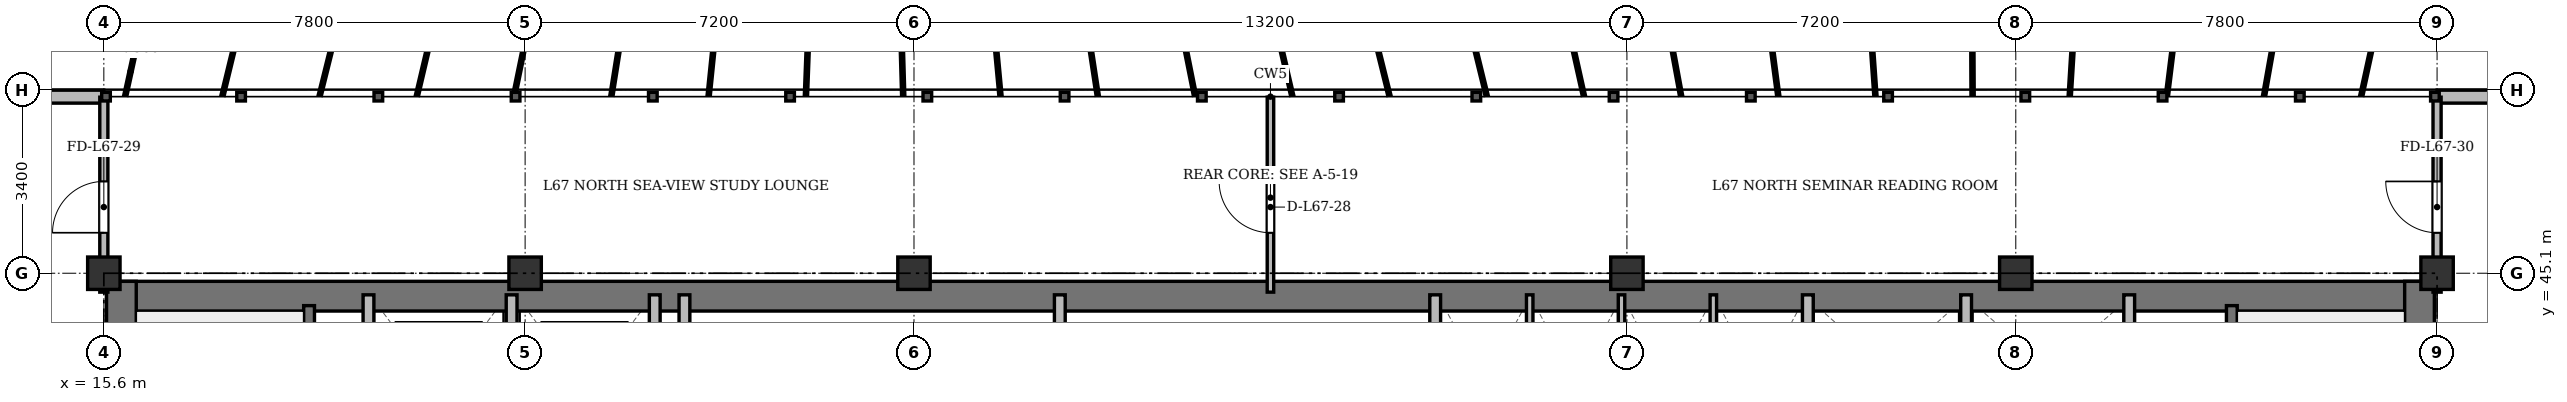
"""IFC4 building model, lengths in metres.
Left out: names, types, materials, properties, quantities, classifications, styles, units other than length and angle.
Written with IfcOpenShell. Run it as: python <this file> out.ifc"""

import sys

from ifc_helpers import new_model, si_unit, direction, frame, frame_2d, origin, origin_2d, place, context, subcontext, project, spatial, rectangle, extrude, source, transform, mapped, element, fill, save


model = new_model("IFC4")
c1 = context("Model", 3, precision=1e-05, world=origin(), true_north=direction((0.0, 1.0)))
c2 = subcontext(c1, "Body", "Model", "MODEL_VIEW")
j1 = project(units=[si_unit("LENGTHUNIT", "METRE"), si_unit("PLANEANGLEUNIT", "RADIAN")], contexts=[c1])
p1 = place(None, origin())
s1 = spatial("IfcSite", under=j1, at=p1, CompositionType="ELEMENT")
p2 = place(p1, origin())
s2 = spatial("IfcBuilding", under=s1, at=p2, CompositionType="ELEMENT")
p3 = place(p2, frame((0.0, 0.0, 259.5)))
s3 = spatial("IfcBuildingStorey", under=s2, at=p3, CompositionType="ELEMENT", Elevation=259.5)
m1 = source(origin(), c2, "Body", "SweptSolid", [
    extrude(rectangle(XDim=0.6, YDim=0.6, at=origin_2d()), origin(), (0.0, 0.0, 1.0), 3.6),
])
for number, where, z_axis, x_axis in (
    (1, (15.6, 45.1, 0.0), (0.0, 0.0, 1.0), (1.0, 0.0, 0.0)),
    (2, (23.4, 45.1, 0.0), (0.0, 0.0, 1.0), (1.0, 0.0, 0.0)),
    (3, (30.6, 45.1, 0.0), (0.0, 0.0, 1.0), (1.0, 0.0, 0.0)),
    (4, (43.8, 45.1, 0.0), (0.0, 0.0, 1.0), (1.0, 0.0, 0.0)),
    (5, (51.0, 45.1, 0.0), (0.0, 0.0, 1.0), (1.0, 0.0, 0.0)),
    (6, (58.8, 45.1, 0.0), (0.0, 0.0, 1.0), (1.0, 0.0, 0.0)),
):
    element("IfcColumn", number, at=place(p3, frame(where, z_axis=z_axis, x_axis=x_axis)), inside=s3, PredefinedType="COLUMN", context=c2, shape_type="MappedRepresentation", body=[
        mapped(m1, transform((0.0, 0.0, 0.0), x_axis=(1.0, 0.0, 0.0), y_axis=(0.0, 1.0, 0.0), z_axis=(0.0, 0.0, 1.0), scale=1.0)),
    ])
p4 = place(p3, frame((11.3, 48.37, 0.0), z_axis=(0.0, 0.0, 1.0), x_axis=(1.0, 0.0, 0.0)))
e7 = element("IfcWall", 7, at=p4, inside=s3, PredefinedType="SOLIDWALL", context=c2, shape_type="SweptSolid", body=[
    extrude(rectangle(XDim=4.3, YDim=0.24, at=frame_2d((2.15, 0.0))), origin(), (0.0, 0.0, 1.0), 3.37),
])
p5 = place(p4, frame((1.848, 0.0, 0.9)))
e8 = element("IfcOpeningElement", 8, at=p5, cuts=e7, PredefinedType="OPENING", context=c2, shape_type="SweptSolid", body=[
    extrude(rectangle(XDim=1.35, YDim=1.5, at=frame_2d((0.675, 0.75))), frame((0.0, 0.13, 0.0), z_axis=(0.0, -1.0, 0.0), x_axis=(1.0, 0.0, 0.0)), (0.0, 0.0, 1.0), 0.26),
])
p6 = place(p3, frame((58.8, 48.37, 0.0), z_axis=(0.0, 0.0, 1.0), x_axis=(1.0, 0.0, 0.0)))
e9 = element("IfcWall", 9, at=p6, inside=s3, PredefinedType="SOLIDWALL", context=c2, shape_type="SweptSolid", body=[
    extrude(rectangle(XDim=4.3, YDim=0.24, at=frame_2d((2.15, 0.0))), origin(), (0.0, 0.0, 1.0), 3.37),
])
p7 = place(p6, frame((1.475, 0.0, 0.9)))
e10 = element("IfcOpeningElement", 10, at=p7, cuts=e9, PredefinedType="OPENING", context=c2, shape_type="SweptSolid", body=[
    extrude(rectangle(XDim=1.35, YDim=1.5, at=frame_2d((0.675, 0.75))), frame((0.0, 0.13, 0.0), z_axis=(0.0, -1.0, 0.0), x_axis=(1.0, 0.0, 0.0)), (0.0, 0.0, 1.0), 0.26),
])
p8 = place(p3, frame((15.65, 44.675, 0.0), z_axis=(0.0, 0.0, 1.0), x_axis=(1.0, 0.0, 0.0)))
e11 = element("IfcWall", 11, at=p8, inside=s3, PredefinedType="SHEAR", context=c2, shape_type="SweptSolid", body=[
    extrude(rectangle(XDim=43.1, YDim=0.55, at=frame_2d((21.55, 0.0))), origin(), (0.0, 0.0, 1.0), 3.37),
])
for number, where, z_axis, x_axis in (
    (12, (15.925, 33.4, 0.0), (0.0, 0.0, 1.0), (0.0, 1.0, 0.0)),
    (13, (58.475, 33.4, 0.0), (0.0, 0.0, 1.0), (0.0, 1.0, 0.0)),
):
    element("IfcWall", number, at=place(p3, frame(where, z_axis=z_axis, x_axis=x_axis)), inside=s3, PredefinedType="SHEAR", context=c2, shape_type="SweptSolid", body=[
        extrude(rectangle(XDim=11.55, YDim=0.55, at=frame_2d((5.775, 0.0))), origin(), (0.0, 0.0, 1.0), 3.37),
    ])
p9 = place(p3, frame((19.4, 33.4, 0.0), z_axis=(0.0, 0.0, 1.0), x_axis=(0.0, 1.0, 0.0)))
e14 = element("IfcWall", 14, at=p9, inside=s3, PredefinedType="SHEAR", context=c2, shape_type="SweptSolid", body=[
    extrude(rectangle(XDim=11.1, YDim=0.2, at=frame_2d((5.55, 0.0))), origin(), (0.0, 0.0, 1.0), 3.37),
])
p10 = place(p9, frame((0.85, 0.0, 0.0)))
e15 = element("IfcOpeningElement", 15, at=p10, cuts=e14, PredefinedType="OPENING", context=c2, shape_type="SweptSolid", body=[
    extrude(rectangle(XDim=1.1, YDim=2.15, at=frame_2d((0.55, 1.075))), frame((0.0, 0.11, 0.0), z_axis=(0.0, -1.0, 0.0), x_axis=(1.0, 0.0, 0.0)), (0.0, 0.0, 1.0), 0.22),
])
p11 = place(p3, frame((55.0, 33.4, 0.0), z_axis=(0.0, 0.0, 1.0), x_axis=(0.0, 1.0, 0.0)))
e16 = element("IfcWall", 16, at=p11, inside=s3, PredefinedType="SHEAR", context=c2, shape_type="SweptSolid", body=[
    extrude(rectangle(XDim=11.1, YDim=0.2, at=frame_2d((5.55, 0.0))), origin(), (0.0, 0.0, 1.0), 3.37),
])
p12 = place(p11, frame((0.85, 0.0, 0.0)))
e17 = element("IfcOpeningElement", 17, at=p12, cuts=e16, PredefinedType="OPENING", context=c2, shape_type="SweptSolid", body=[
    extrude(rectangle(XDim=1.1, YDim=2.15, at=frame_2d((0.55, 1.075))), frame((0.0, 0.11, 0.0), z_axis=(0.0, -1.0, 0.0), x_axis=(1.0, 0.0, 0.0)), (0.0, 0.0, 1.0), 0.22),
])
for number, where, z_axis, x_axis in (
    (18, (20.5, 41.3, 0.0), (0.0, 0.0, 1.0), (0.0, 1.0, 0.0)),
    (19, (23.15, 41.3, 0.0), (0.0, 0.0, 1.0), (0.0, 1.0, 0.0)),
    (20, (25.8, 41.3, 0.0), (0.0, 0.0, 1.0), (0.0, 1.0, 0.0)),
):
    element("IfcWall", number, at=place(p3, frame(where, z_axis=z_axis, x_axis=x_axis)), inside=s3, PredefinedType="SOLIDWALL", context=c2, shape_type="SweptSolid", body=[
        extrude(rectangle(XDim=3.4, YDim=0.2, at=frame_2d((1.7, 0.0))), origin(), (0.0, 0.0, 1.0), 3.37),
    ])
for number, where, z_axis, x_axis in (
    (21, (26.35, 33.4, 0.0), (0.0, 0.0, 1.0), (0.0, 1.0, 0.0)),
    (22, (33.3, 33.4, 0.0), (0.0, 0.0, 1.0), (0.0, 1.0, 0.0)),
):
    element("IfcWall", number, at=place(p3, frame(where, z_axis=z_axis, x_axis=x_axis)), inside=s3, PredefinedType="SOLIDWALL", context=c2, shape_type="SweptSolid", body=[
        extrude(rectangle(XDim=11.3, YDim=0.2, at=frame_2d((5.65, 0.0))), origin(), (0.0, 0.0, 1.0), 2.92),
    ])
p13 = place(p3, frame((40.25, 41.5, 0.0), z_axis=(0.0, 0.0, 1.0), x_axis=(0.0, 1.0, 0.0)))
e23 = element("IfcWall", 23, at=p13, inside=s3, PredefinedType="SOLIDWALL", context=c2, shape_type="SweptSolid", body=[
    extrude(rectangle(XDim=3.2, YDim=0.2, at=frame_2d((1.6, 0.0))), origin(), (0.0, 0.0, 1.0), 3.37),
])
for number, where, z_axis, x_axis in (
    (24, (42.0, 41.5, 0.0), (0.0, 0.0, 1.0), (0.0, 1.0, 0.0)),
    (25, (43.7, 41.5, 0.0), (0.0, 0.0, 1.0), (0.0, 1.0, 0.0)),
    (26, (45.4, 41.5, 0.0), (0.0, 0.0, 1.0), (0.0, 1.0, 0.0)),
):
    element("IfcWall", number, at=place(p3, frame(where, z_axis=z_axis, x_axis=x_axis)), inside=s3, PredefinedType="PARTITIONING", context=c2, shape_type="SweptSolid", body=[
        extrude(rectangle(XDim=3.2, YDim=0.12, at=frame_2d((1.6, 0.0))), origin(), (0.0, 0.0, 1.0), 3.37),
    ])
p14 = place(p3, frame((47.15, 33.4, 0.0), z_axis=(0.0, 0.0, 1.0), x_axis=(0.0, 1.0, 0.0)))
e27 = element("IfcWall", 27, at=p14, inside=s3, PredefinedType="SOLIDWALL", context=c2, shape_type="SweptSolid", body=[
    extrude(rectangle(XDim=11.3, YDim=0.2, at=frame_2d((5.65, 0.0))), origin(), (0.0, 0.0, 1.0), 2.92),
])
for number, where, z_axis, x_axis in (
    (28, (50.08, 42.05, 0.0), (0.0, 0.0, 1.0), (0.0, 1.0, 0.0)),
    (29, (53.1, 42.05, 0.0), (0.0, 0.0, 1.0), (0.0, 1.0, 0.0)),
):
    element("IfcWall", number, at=place(p3, frame(where, z_axis=z_axis, x_axis=x_axis)), inside=s3, PredefinedType="SOLIDWALL", context=c2, shape_type="SweptSolid", body=[
        extrude(rectangle(XDim=2.65, YDim=0.2, at=frame_2d((1.325, 0.0))), origin(), (0.0, 0.0, 1.0), 3.37),
    ])
p15 = place(p3, frame((37.2, 44.75, 0.0), z_axis=(0.0, 0.0, 1.0), x_axis=(0.0, 1.0, 0.0)))
e30 = element("IfcWall", 30, at=p15, inside=s3, PredefinedType="PARTITIONING", context=c2, shape_type="SweptSolid", body=[
    extrude(rectangle(XDim=3.61, YDim=0.12, at=frame_2d((1.805, 0.0))), origin(), (0.0, 0.0, 1.0), 2.92),
])
p16 = place(p15, frame((1.1, 0.0, 0.0)))
e31 = element("IfcOpeningElement", 31, at=p16, cuts=e30, PredefinedType="OPENING", context=c2, shape_type="SweptSolid", body=[
    extrude(rectangle(XDim=0.95, YDim=2.15, at=frame_2d((0.475, 1.075))), frame((0.0, 0.07, 0.0), z_axis=(0.0, -1.0, 0.0), x_axis=(1.0, 0.0, 0.0)), (0.0, 0.0, 1.0), 0.14),
])
p17 = place(p3, frame((15.6, 44.75, 0.0), z_axis=(0.0, 0.0, 1.0), x_axis=(0.0, 1.0, 0.0)))
e32 = element("IfcWall", 32, at=p17, inside=s3, PredefinedType="PARTITIONING", context=c2, shape_type="SweptSolid", body=[
    extrude(rectangle(XDim=3.61, YDim=0.15, at=frame_2d((1.805, 0.0))), origin(), (0.0, 0.0, 1.0), 2.87),
])
p18 = place(p17, frame((1.1, 0.0, 0.0)))
e33 = element("IfcOpeningElement", 33, at=p18, cuts=e32, PredefinedType="OPENING", context=c2, shape_type="SweptSolid", body=[
    extrude(rectangle(XDim=0.95, YDim=2.15, at=frame_2d((0.475, 1.075))), frame((0.0, 0.085, 0.0), z_axis=(0.0, -1.0, 0.0), x_axis=(1.0, 0.0, 0.0)), (0.0, 0.0, 1.0), 0.17),
])
p19 = place(p3, frame((58.8, 44.75, 0.0), z_axis=(0.0, 0.0, 1.0), x_axis=(0.0, 1.0, 0.0)))
e34 = element("IfcWall", 34, at=p19, inside=s3, PredefinedType="PARTITIONING", context=c2, shape_type="SweptSolid", body=[
    extrude(rectangle(XDim=3.61, YDim=0.15, at=frame_2d((1.805, 0.0))), origin(), (0.0, 0.0, 1.0), 2.87),
])
p20 = place(p19, frame((1.1, 0.0, 0.0)))
e35 = element("IfcOpeningElement", 35, at=p20, cuts=e34, PredefinedType="OPENING", context=c2, shape_type="SweptSolid", body=[
    extrude(rectangle(XDim=0.95, YDim=2.15, at=frame_2d((0.475, 1.075))), frame((0.0, 0.085, 0.0), z_axis=(0.0, -1.0, 0.0), x_axis=(1.0, 0.0, 0.0)), (0.0, 0.0, 1.0), 0.17),
])
m2 = source(origin(), c2, "Body", "SweptSolid", [
    extrude(rectangle(XDim=0.95, YDim=2.15, at=frame_2d((0.475, 1.075))), frame((0.0, 0.025, 0.0), z_axis=(0.0, -1.0, 0.0), x_axis=(1.0, 0.0, 0.0)), (0.0, 0.0, 1.0), 0.05),
])
p21 = place(p16, origin())
e36 = element("IfcDoor", 36, at=p21, inside=s3, OperationType="SINGLE_SWING_RIGHT", PredefinedType="DOOR", context=c2, shape_type="MappedRepresentation", body=[
    mapped(m2, transform((0.0, 0.0, 0.0), x_axis=(1.0, 0.0, 0.0), y_axis=(0.0, 1.0, 0.0), z_axis=(0.0, 0.0, 1.0), scale=1.0)),
])
fill(e31, e36)
p22 = place(p18, origin())
e37 = element("IfcDoor", 37, at=p22, inside=s3, OperationType="SINGLE_SWING_LEFT", PredefinedType="DOOR", context=c2, shape_type="MappedRepresentation", body=[
    mapped(m2, transform((0.0, 0.0, 0.0), x_axis=(1.0, 0.0, 0.0), y_axis=(0.0, 1.0, 0.0), z_axis=(0.0, 0.0, 1.0), scale=1.0)),
])
fill(e33, e37)
p23 = place(p20, origin())
e38 = element("IfcDoor", 38, at=p23, inside=s3, OperationType="SINGLE_SWING_RIGHT", PredefinedType="DOOR", context=c2, shape_type="MappedRepresentation", body=[
    mapped(m2, transform((0.0, 0.0, 0.0), x_axis=(1.0, 0.0, 0.0), y_axis=(0.0, 1.0, 0.0), z_axis=(0.0, 0.0, 1.0), scale=1.0)),
])
fill(e35, e38)
save(model, sys.argv[1])
